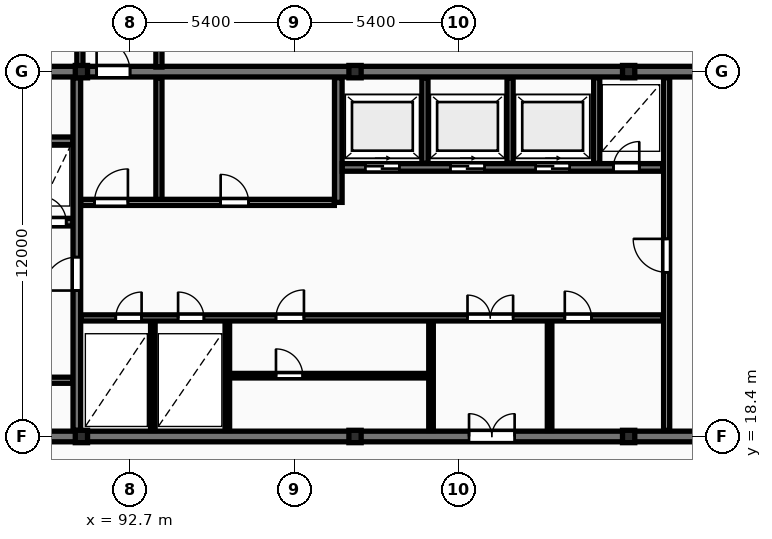
"""IFC4 building model, lengths in metres.
Left out: names, types, materials, properties, quantities, classifications, styles, units other than length and angle.
Written with IfcOpenShell. Run it as: python <this file> out.ifc"""

import sys

from ifc_helpers import new_model, si_unit, direction, frame, frame_2d, origin, origin_2d, place, context, subcontext, project, spatial, rectangle, i_section, extrude, element, fill, save


model = new_model("IFC4")
c1 = context("Model", 3, precision=1e-05, world=origin(), true_north=direction((0.0, 1.0)))
c2 = subcontext(c1, "Body", "Model", "MODEL_VIEW")
j1 = project(units=[si_unit("LENGTHUNIT", "METRE"), si_unit("PLANEANGLEUNIT", "RADIAN")], contexts=[c1])
p1 = place(None, origin())
s1 = spatial("IfcSite", under=j1, at=p1, CompositionType="ELEMENT")
p2 = place(p1, origin())
s2 = spatial("IfcBuilding", under=s1, at=p2, CompositionType="ELEMENT")
p3 = place(p2, frame((0.0, 0.0, 139.3)))
s3 = spatial("IfcBuildingStorey", under=s2, at=p3, CompositionType="ELEMENT", Elevation=139.3)
for number, where, z_axis, x_axis in (
    (1, (91.1, 18.4, 0.0), (0.0, 0.0, 1.0), (1.0, 0.0, 0.0)),
    (2, (91.1, 30.4, 0.0), (0.0, 0.0, 1.0), (1.0, 0.0, 0.0)),
    (3, (100.1, 18.4, 0.0), (0.0, 0.0, 1.0), (1.0, 0.0, 0.0)),
    (4, (100.1, 30.4, 0.0), (0.0, 0.0, 1.0), (1.0, 0.0, 0.0)),
    (5, (109.1, 18.4, 0.0), (0.0, 0.0, 1.0), (1.0, 0.0, 0.0)),
    (6, (109.1, 30.4, 0.0), (0.0, 0.0, 1.0), (1.0, 0.0, 0.0)),
):
    element("IfcColumn", number, at=place(p3, frame(where, z_axis=z_axis, x_axis=x_axis)), inside=s3, PredefinedType="COLUMN", context=c2, shape_type="SweptSolid", body=[
        extrude(i_section(OverallWidth=0.403, OverallDepth=0.406, WebThickness=0.027, FlangeThickness=0.043, FilletRadius=0.015, at=origin_2d()), origin(), (0.0, 0.0, 1.0), 3.6),
    ])
p4 = place(p3, frame((81.925, 30.4, 0.0), z_axis=(0.0, 0.0, 1.0), x_axis=(1.0, 0.0, 0.0)))
e7 = element("IfcWall", 7, at=p4, inside=s3, PredefinedType="SHEAR", context=c2, shape_type="SweptSolid", body=[
    extrude(rectangle(XDim=36.265, YDim=0.35, at=frame_2d((18.132, 0.0))), origin(), (0.0, 0.0, 1.0), 3.6),
])
p5 = place(p4, frame((9.675, 0.0, 0.0)))
e8 = element("IfcOpeningElement", 8, at=p5, cuts=e7, PredefinedType="OPENING", context=c2, shape_type="SweptSolid", body=[
    extrude(rectangle(XDim=1.1, YDim=2.1, at=frame_2d((0.55, 1.05))), frame((0.0, 0.185, 0.0), z_axis=(0.0, -1.0, 0.0), x_axis=(1.0, 0.0, 0.0)), (0.0, 0.0, 1.0), 0.37),
])
p6 = place(p3, frame((81.925, 18.4, 0.0), z_axis=(0.0, 0.0, 1.0), x_axis=(1.0, 0.0, 0.0)))
e9 = element("IfcWall", 9, at=p6, inside=s3, PredefinedType="SHEAR", context=c2, shape_type="SweptSolid", body=[
    extrude(rectangle(XDim=36.265, YDim=0.35, at=frame_2d((18.132, 0.0))), origin(), (0.0, 0.0, 1.0), 3.6),
])
p7 = place(p6, frame((5.675, 0.0, 0.0)))
e10 = element("IfcOpeningElement", 10, at=p7, cuts=e9, PredefinedType="OPENING", context=c2, shape_type="SweptSolid", body=[
    extrude(rectangle(XDim=1.0, YDim=2.15, at=frame_2d((0.5, 1.075))), frame((0.0, 0.185, 0.0), z_axis=(0.0, -1.0, 0.0), x_axis=(1.0, 0.0, 0.0)), (0.0, 0.0, 1.0), 0.37),
])
p8 = place(p6, frame((21.925, 0.0, 0.0)))
e11 = element("IfcOpeningElement", 11, at=p8, cuts=e9, PredefinedType="OPENING", context=c2, shape_type="SweptSolid", body=[
    extrude(rectangle(XDim=1.5, YDim=2.2, at=frame_2d((0.75, 1.1))), frame((0.0, 0.185, 0.0), z_axis=(0.0, -1.0, 0.0), x_axis=(1.0, 0.0, 0.0)), (0.0, 0.0, 1.0), 0.37),
])
p9 = place(p6, frame((29.875, 0.0, 0.0)))
e12 = element("IfcOpeningElement", 12, at=p9, cuts=e9, PredefinedType="OPENING", context=c2, shape_type="SweptSolid", body=[
    extrude(rectangle(XDim=1.0, YDim=2.15, at=frame_2d((0.5, 1.075))), frame((0.0, 0.185, 0.0), z_axis=(0.0, -1.0, 0.0), x_axis=(1.0, 0.0, 0.0)), (0.0, 0.0, 1.0), 0.37),
])
p10 = place(p3, frame((83.0, 28.125, 0.0), z_axis=(0.0, 0.0, 1.0), x_axis=(1.0, 0.0, 0.0)))
e13 = element("IfcWall", 13, at=p10, inside=s3, PredefinedType="SHEAR", context=c2, shape_type="SweptSolid", body=[
    extrude(rectangle(XDim=7.82, YDim=0.25, at=frame_2d((3.91, 0.0))), origin(), (0.0, 0.0, 1.0), 3.6),
])
p11 = place(p3, frame((86.5, 25.45, 0.0), z_axis=(0.0, 0.0, 1.0), x_axis=(1.0, 0.0, 0.0)))
e14 = element("IfcWall", 14, at=p11, inside=s3, PredefinedType="SHEAR", context=c2, shape_type="SweptSolid", body=[
    extrude(rectangle(XDim=4.32, YDim=0.25, at=frame_2d((2.16, 0.0))), origin(), (0.0, 0.0, 1.0), 3.6),
])
p12 = place(p11, frame((1.14, 0.0, 0.0)))
e15 = element("IfcOpeningElement", 15, at=p12, cuts=e14, PredefinedType="OPENING", context=c2, shape_type="SweptSolid", body=[
    extrude(rectangle(XDim=1.12, YDim=2.12, at=frame_2d((0.56, 1.06))), frame((0.0, 0.135, 0.0), z_axis=(0.0, -1.0, 0.0), x_axis=(1.0, 0.0, 0.0)), (0.0, 0.0, 1.0), 0.27),
])
p13 = place(p11, frame((3.25, 0.0, 0.0)))
e16 = element("IfcOpeningElement", 16, at=p13, cuts=e14, PredefinedType="OPENING", context=c2, shape_type="SweptSolid", body=[
    extrude(rectangle(XDim=0.85, YDim=2.05, at=frame_2d((0.425, 1.025))), frame((0.0, 0.135, 0.0), z_axis=(0.0, -1.0, 0.0), x_axis=(1.0, 0.0, 0.0)), (0.0, 0.0, 1.0), 0.27),
])
p14 = place(p3, frame((86.5, 20.25, 0.0), z_axis=(0.0, 0.0, 1.0), x_axis=(1.0, 0.0, 0.0)))
e17 = element("IfcWall", 17, at=p14, inside=s3, PredefinedType="PARTITIONING", context=c2, shape_type="SweptSolid", body=[
    extrude(rectangle(XDim=4.32, YDim=0.2, at=frame_2d((2.16, 0.0))), origin(), (0.0, 0.0, 1.0), 3.31),
])
p15 = place(p14, frame((1.4, 0.0, 0.0)))
e18 = element("IfcOpeningElement", 18, at=p15, cuts=e17, PredefinedType="OPENING", context=c2, shape_type="SweptSolid", body=[
    extrude(rectangle(XDim=1.1, YDim=2.1, at=frame_2d((0.55, 1.05))), frame((0.0, 0.11, 0.0), z_axis=(0.0, -1.0, 0.0), x_axis=(1.0, 0.0, 0.0)), (0.0, 0.0, 1.0), 0.22),
])
p16 = place(p3, frame((90.95, 18.6, 0.0), z_axis=(0.0, 0.0, 1.0), x_axis=(0.0, 1.0, 0.0)))
e19 = element("IfcWall", 19, at=p16, inside=s3, PredefinedType="SHEAR", context=c2, shape_type="SweptSolid", body=[
    extrude(rectangle(XDim=11.6, YDim=0.25, at=frame_2d((5.8, 0.0))), origin(), (0.0, 0.0, 1.0), 3.6),
])
p17 = place(p16, frame((4.6, 0.0, 0.0)))
e20 = element("IfcOpeningElement", 20, at=p17, cuts=e19, PredefinedType="OPENING", context=c2, shape_type="SweptSolid", body=[
    extrude(rectangle(XDim=1.1, YDim=2.1, at=frame_2d((0.55, 1.05))), frame((0.0, 0.135, 0.0), z_axis=(0.0, -1.0, 0.0), x_axis=(1.0, 0.0, 0.0)), (0.0, 0.0, 1.0), 0.27),
])
p18 = place(p3, frame((93.65, 26.1, 0.0), z_axis=(0.0, 0.0, 1.0), x_axis=(0.0, 1.0, 0.0)))
e21 = element("IfcWall", 21, at=p18, inside=s3, PredefinedType="PARTITIONING", context=c2, shape_type="SweptSolid", body=[
    extrude(rectangle(XDim=4.1, YDim=0.2, at=frame_2d((2.05, 0.0))), origin(), (0.0, 0.0, 1.0), 3.31),
])
p19 = place(p3, frame((91.08, 26.1, 0.0), z_axis=(0.0, 0.0, 1.0), x_axis=(1.0, 0.0, 0.0)))
e22 = element("IfcWall", 22, at=p19, inside=s3, PredefinedType="PARTITIONING", context=c2, shape_type="SweptSolid", body=[
    extrude(rectangle(XDim=8.34, YDim=0.2, at=frame_2d((4.17, 0.0))), origin(), (0.0, 0.0, 1.0), 3.31),
])
p20 = place(p19, frame((0.45, 0.0, 0.0)))
e23 = element("IfcOpeningElement", 23, at=p20, cuts=e22, PredefinedType="OPENING", context=c2, shape_type="SweptSolid", body=[
    extrude(rectangle(XDim=1.1, YDim=2.1, at=frame_2d((0.55, 1.05))), frame((0.0, 0.11, 0.0), z_axis=(0.0, -1.0, 0.0), x_axis=(1.0, 0.0, 0.0)), (0.0, 0.0, 1.0), 0.22),
])
p21 = place(p19, frame((4.6, 0.0, 0.0)))
e24 = element("IfcOpeningElement", 24, at=p21, cuts=e22, PredefinedType="OPENING", context=c2, shape_type="SweptSolid", body=[
    extrude(rectangle(XDim=0.92, YDim=2.08, at=frame_2d((0.46, 1.04))), frame((0.0, 0.11, 0.0), z_axis=(0.0, -1.0, 0.0), x_axis=(1.0, 0.0, 0.0)), (0.0, 0.0, 1.0), 0.22),
])
p22 = place(p3, frame((99.55, 26.1, 0.0), z_axis=(0.0, 0.0, 1.0), x_axis=(0.0, 1.0, 0.0)))
e25 = element("IfcWall", 25, at=p22, inside=s3, PredefinedType="SHEAR", context=c2, shape_type="SweptSolid", body=[
    extrude(rectangle(XDim=4.1, YDim=0.25, at=frame_2d((2.05, 0.0))), origin(), (0.0, 0.0, 1.0), 3.6),
])
for number, where, z_axis, x_axis in (
    (26, (102.4, 27.38, 0.0), (0.0, 0.0, 1.0), (0.0, 1.0, 0.0)),
    (27, (105.2, 27.38, 0.0), (0.0, 0.0, 1.0), (0.0, 1.0, 0.0)),
    (28, (108.05, 27.38, 0.0), (0.0, 0.0, 1.0), (0.0, 1.0, 0.0)),
):
    element("IfcWall", number, at=place(p3, frame(where, z_axis=z_axis, x_axis=x_axis)), inside=s3, PredefinedType="PARTITIONING", context=c2, shape_type="SweptSolid", body=[
        extrude(rectangle(XDim=2.82, YDim=0.2, at=frame_2d((1.41, 0.0))), origin(), (0.0, 0.0, 1.0), 3.31),
    ])
p23 = place(p3, frame((99.68, 27.25, 0.0), z_axis=(0.0, 0.0, 1.0), x_axis=(1.0, 0.0, 0.0)))
e29 = element("IfcWall", 29, at=p23, inside=s3, PredefinedType="SHEAR", context=c2, shape_type="SweptSolid", body=[
    extrude(rectangle(XDim=10.54, YDim=0.25, at=frame_2d((5.27, 0.0))), origin(), (0.0, 0.0, 1.0), 3.6),
])
p24 = place(p23, frame((0.76, 0.0, 0.0)))
e30 = element("IfcOpeningElement", 30, at=p24, cuts=e29, PredefinedType="OPENING", context=c2, shape_type="SweptSolid", body=[
    extrude(rectangle(XDim=1.12, YDim=2.12, at=frame_2d((0.56, 1.06))), frame((0.0, 0.135, 0.0), z_axis=(0.0, -1.0, 0.0), x_axis=(1.0, 0.0, 0.0)), (0.0, 0.0, 1.0), 0.27),
])
p25 = place(p23, frame((3.56, 0.0, 0.0)))
e31 = element("IfcOpeningElement", 31, at=p25, cuts=e29, PredefinedType="OPENING", context=c2, shape_type="SweptSolid", body=[
    extrude(rectangle(XDim=1.12, YDim=2.12, at=frame_2d((0.56, 1.06))), frame((0.0, 0.135, 0.0), z_axis=(0.0, -1.0, 0.0), x_axis=(1.0, 0.0, 0.0)), (0.0, 0.0, 1.0), 0.27),
])
p26 = place(p23, frame((6.36, 0.0, 0.0)))
e32 = element("IfcOpeningElement", 32, at=p26, cuts=e29, PredefinedType="OPENING", context=c2, shape_type="SweptSolid", body=[
    extrude(rectangle(XDim=1.12, YDim=2.12, at=frame_2d((0.56, 1.06))), frame((0.0, 0.135, 0.0), z_axis=(0.0, -1.0, 0.0), x_axis=(1.0, 0.0, 0.0)), (0.0, 0.0, 1.0), 0.27),
])
p27 = place(p23, frame((8.92, 0.0, 0.0)))
e33 = element("IfcOpeningElement", 33, at=p27, cuts=e29, PredefinedType="OPENING", context=c2, shape_type="SweptSolid", body=[
    extrude(rectangle(XDim=0.85, YDim=2.05, at=frame_2d((0.425, 1.025))), frame((0.0, 0.135, 0.0), z_axis=(0.0, -1.0, 0.0), x_axis=(1.0, 0.0, 0.0)), (0.0, 0.0, 1.0), 0.27),
])
for number, where, z_axis, x_axis in (
    (34, (93.45, 18.6, 0.0), (0.0, 0.0, 1.0), (0.0, 1.0, 0.0)),
    (35, (95.9, 18.6, 0.0), (0.0, 0.0, 1.0), (0.0, 1.0, 0.0)),
):
    element("IfcWall", number, at=place(p3, frame(where, z_axis=z_axis, x_axis=x_axis)), inside=s3, PredefinedType="PARTITIONING", context=c2, shape_type="SweptSolid", body=[
        extrude(rectangle(XDim=3.6, YDim=0.15, at=frame_2d((1.8, 0.0))), origin(), (0.0, 0.0, 1.0), 3.31),
    ])
p28 = place(p3, frame((95.9, 20.4, 0.0), z_axis=(0.0, 0.0, 1.0), x_axis=(1.0, 0.0, 0.0)))
e36 = element("IfcWall", 36, at=p28, inside=s3, PredefinedType="PARTITIONING", context=c2, shape_type="SweptSolid", body=[
    extrude(rectangle(XDim=6.7, YDim=0.15, at=frame_2d((3.35, 0.0))), origin(), (0.0, 0.0, 1.0), 3.31),
])
p29 = place(p28, frame((1.6, 0.0, 0.0)))
e37 = element("IfcOpeningElement", 37, at=p29, cuts=e36, PredefinedType="OPENING", context=c2, shape_type="SweptSolid", body=[
    extrude(rectangle(XDim=0.88, YDim=2.06, at=frame_2d((0.44, 1.03))), frame((0.0, 0.085, 0.0), z_axis=(0.0, -1.0, 0.0), x_axis=(1.0, 0.0, 0.0)), (0.0, 0.0, 1.0), 0.17),
])
for number, where, z_axis, x_axis in (
    (38, (102.6, 18.6, 0.0), (0.0, 0.0, 1.0), (0.0, 1.0, 0.0)),
    (39, (106.5, 18.6, 0.0), (0.0, 0.0, 1.0), (0.0, 1.0, 0.0)),
):
    element("IfcWall", number, at=place(p3, frame(where, z_axis=z_axis, x_axis=x_axis)), inside=s3, PredefinedType="PARTITIONING", context=c2, shape_type="SweptSolid", body=[
        extrude(rectangle(XDim=3.6, YDim=0.15, at=frame_2d((1.8, 0.0))), origin(), (0.0, 0.0, 1.0), 3.31),
    ])
p30 = place(p3, frame((91.08, 22.3, 0.0), z_axis=(0.0, 0.0, 1.0), x_axis=(1.0, 0.0, 0.0)))
e40 = element("IfcWall", 40, at=p30, inside=s3, PredefinedType="PARTITIONING", context=c2, shape_type="SweptSolid", body=[
    extrude(rectangle(XDim=19.14, YDim=0.2, at=frame_2d((9.57, 0.0))), origin(), (0.0, 0.0, 1.0), 3.31),
])
p31 = place(p30, frame((1.15, 0.0, 0.0)))
e41 = element("IfcOpeningElement", 41, at=p31, cuts=e40, PredefinedType="OPENING", context=c2, shape_type="SweptSolid", body=[
    extrude(rectangle(XDim=0.85, YDim=2.05, at=frame_2d((0.425, 1.025))), frame((0.0, 0.11, 0.0), z_axis=(0.0, -1.0, 0.0), x_axis=(1.0, 0.0, 0.0)), (0.0, 0.0, 1.0), 0.22),
])
p32 = place(p30, frame((3.2, 0.0, 0.0)))
e42 = element("IfcOpeningElement", 42, at=p32, cuts=e40, PredefinedType="OPENING", context=c2, shape_type="SweptSolid", body=[
    extrude(rectangle(XDim=0.85, YDim=2.05, at=frame_2d((0.425, 1.025))), frame((0.0, 0.11, 0.0), z_axis=(0.0, -1.0, 0.0), x_axis=(1.0, 0.0, 0.0)), (0.0, 0.0, 1.0), 0.22),
])
p33 = place(p30, frame((12.72, 0.0, 0.0)))
e43 = element("IfcOpeningElement", 43, at=p33, cuts=e40, PredefinedType="OPENING", context=c2, shape_type="SweptSolid", body=[
    extrude(rectangle(XDim=1.5, YDim=2.2, at=frame_2d((0.75, 1.1))), frame((0.0, 0.11, 0.0), z_axis=(0.0, -1.0, 0.0), x_axis=(1.0, 0.0, 0.0)), (0.0, 0.0, 1.0), 0.22),
])
p34 = place(p30, frame((6.42, 0.0, 0.0)))
e44 = element("IfcOpeningElement", 44, at=p34, cuts=e40, PredefinedType="OPENING", context=c2, shape_type="SweptSolid", body=[
    extrude(rectangle(XDim=0.92, YDim=2.08, at=frame_2d((0.46, 1.04))), frame((0.0, 0.11, 0.0), z_axis=(0.0, -1.0, 0.0), x_axis=(1.0, 0.0, 0.0)), (0.0, 0.0, 1.0), 0.22),
])
p35 = place(p30, frame((15.92, 0.0, 0.0)))
e45 = element("IfcOpeningElement", 45, at=p35, cuts=e40, PredefinedType="OPENING", context=c2, shape_type="SweptSolid", body=[
    extrude(rectangle(XDim=0.88, YDim=2.06, at=frame_2d((0.44, 1.03))), frame((0.0, 0.11, 0.0), z_axis=(0.0, -1.0, 0.0), x_axis=(1.0, 0.0, 0.0)), (0.0, 0.0, 1.0), 0.22),
])
p36 = place(p3, frame((110.35, 18.6, 0.0), z_axis=(0.0, 0.0, 1.0), x_axis=(0.0, 1.0, 0.0)))
e46 = element("IfcWall", 46, at=p36, inside=s3, PredefinedType="PARTITIONING", context=c2, shape_type="SweptSolid", body=[
    extrude(rectangle(XDim=11.6, YDim=0.2, at=frame_2d((5.8, 0.0))), origin(), (0.0, 0.0, 1.0), 3.31),
])
p37 = place(p36, frame((5.2, 0.0, 0.0)))
e47 = element("IfcOpeningElement", 47, at=p37, cuts=e46, PredefinedType="OPENING", context=c2, shape_type="SweptSolid", body=[
    extrude(rectangle(XDim=1.1, YDim=2.15, at=frame_2d((0.55, 1.075))), frame((0.0, 0.11, 0.0), z_axis=(0.0, -1.0, 0.0), x_axis=(1.0, 0.0, 0.0)), (0.0, 0.0, 1.0), 0.22),
])
p38 = place(p3, frame((91.05, 30.55, 0.0), z_axis=(0.0, 0.0, 1.0), x_axis=(0.0, 1.0, 0.0)))
e48 = element("IfcWall", 48, at=p38, inside=s3, PredefinedType="PARTITIONING", context=c2, shape_type="SweptSolid", body=[
    extrude(rectangle(XDim=2.2, YDim=0.2, at=frame_2d((1.1, 0.0))), origin(), (0.0, 0.0, 1.0), 3.31),
])
p39 = place(p3, frame((93.65, 30.55, 0.0), z_axis=(0.0, 0.0, 1.0), x_axis=(0.0, 1.0, 0.0)))
e49 = element("IfcWall", 49, at=p39, inside=s3, PredefinedType="PARTITIONING", context=c2, shape_type="SweptSolid", body=[
    extrude(rectangle(XDim=2.2, YDim=0.2, at=frame_2d((1.1, 0.0))), origin(), (0.0, 0.0, 1.0), 2.383),
])
p40 = place(p5, origin())
e50 = element("IfcDoor", 50, at=p40, inside=s3, OperationType="SINGLE_SWING_LEFT", PredefinedType="DOOR", context=c2, shape_type="SweptSolid", body=[
    extrude(rectangle(XDim=1.1, YDim=2.1, at=frame_2d((0.55, 1.05))), frame((0.0, 0.025, 0.0), z_axis=(0.0, -1.0, 0.0), x_axis=(1.0, 0.0, 0.0)), (0.0, 0.0, 1.0), 0.05),
])
fill(e8, e50)
p41 = place(p8, origin())
e51 = element("IfcDoor", 51, at=p41, inside=s3, OperationType="DOUBLE_DOOR_SINGLE_SWING", PredefinedType="DOOR", context=c2, shape_type="SweptSolid", body=[
    extrude(rectangle(XDim=1.5, YDim=2.2, at=frame_2d((0.75, 1.1))), frame((0.0, 0.025, 0.0), z_axis=(0.0, -1.0, 0.0), x_axis=(1.0, 0.0, 0.0)), (0.0, 0.0, 1.0), 0.05),
])
fill(e11, e51)
p42 = place(p13, origin())
e52 = element("IfcDoor", 52, at=p42, inside=s3, OperationType="SINGLE_SWING_LEFT", PredefinedType="DOOR", context=c2, shape_type="SweptSolid", body=[
    extrude(rectangle(XDim=0.85, YDim=2.05, at=frame_2d((0.425, 1.025))), frame((0.0, 0.025, 0.0), z_axis=(0.0, -1.0, 0.0), x_axis=(1.0, 0.0, 0.0)), (0.0, 0.0, 1.0), 0.05),
])
fill(e16, e52)
p43 = place(p17, origin())
e53 = element("IfcDoor", 53, at=p43, inside=s3, OperationType="SINGLE_SWING_LEFT", PredefinedType="DOOR", context=c2, shape_type="SweptSolid", body=[
    extrude(rectangle(XDim=1.1, YDim=2.1, at=frame_2d((0.55, 1.05))), frame((0.0, 0.025, 0.0), z_axis=(0.0, -1.0, 0.0), x_axis=(1.0, 0.0, 0.0)), (0.0, 0.0, 1.0), 0.05),
])
fill(e20, e53)
p44 = place(p20, origin())
e54 = element("IfcDoor", 54, at=p44, inside=s3, OperationType="SINGLE_SWING_RIGHT", PredefinedType="DOOR", context=c2, shape_type="SweptSolid", body=[
    extrude(rectangle(XDim=1.1, YDim=2.1, at=frame_2d((0.55, 1.05))), frame((0.0, 0.025, 0.0), z_axis=(0.0, -1.0, 0.0), x_axis=(1.0, 0.0, 0.0)), (0.0, 0.0, 1.0), 0.05),
])
fill(e23, e54)
p45 = place(p21, origin())
e55 = element("IfcDoor", 55, at=p45, inside=s3, OperationType="SINGLE_SWING_LEFT", PredefinedType="DOOR", context=c2, shape_type="SweptSolid", body=[
    extrude(rectangle(XDim=0.92, YDim=2.08, at=frame_2d((0.46, 1.04))), frame((0.0, 0.025, 0.0), z_axis=(0.0, -1.0, 0.0), x_axis=(1.0, 0.0, 0.0)), (0.0, 0.0, 1.0), 0.05),
])
fill(e24, e55)
p46 = place(p24, origin())
e56 = element("IfcDoor", 56, at=p46, inside=s3, OperationType="SLIDING_TO_RIGHT", PredefinedType="DOOR", context=c2, shape_type="SweptSolid", body=[
    extrude(rectangle(XDim=1.12, YDim=2.12, at=frame_2d((0.56, 1.06))), frame((0.0, 0.025, 0.0), z_axis=(0.0, -1.0, 0.0), x_axis=(1.0, 0.0, 0.0)), (0.0, 0.0, 1.0), 0.05),
])
fill(e30, e56)
p47 = place(p25, origin())
e57 = element("IfcDoor", 57, at=p47, inside=s3, OperationType="SLIDING_TO_RIGHT", PredefinedType="DOOR", context=c2, shape_type="SweptSolid", body=[
    extrude(rectangle(XDim=1.12, YDim=2.12, at=frame_2d((0.56, 1.06))), frame((0.0, 0.025, 0.0), z_axis=(0.0, -1.0, 0.0), x_axis=(1.0, 0.0, 0.0)), (0.0, 0.0, 1.0), 0.05),
])
fill(e31, e57)
p48 = place(p26, origin())
e58 = element("IfcDoor", 58, at=p48, inside=s3, OperationType="SLIDING_TO_RIGHT", PredefinedType="DOOR", context=c2, shape_type="SweptSolid", body=[
    extrude(rectangle(XDim=1.12, YDim=2.12, at=frame_2d((0.56, 1.06))), frame((0.0, 0.025, 0.0), z_axis=(0.0, -1.0, 0.0), x_axis=(1.0, 0.0, 0.0)), (0.0, 0.0, 1.0), 0.05),
])
fill(e32, e58)
p49 = place(p27, origin())
e59 = element("IfcDoor", 59, at=p49, inside=s3, OperationType="SINGLE_SWING_RIGHT", PredefinedType="DOOR", context=c2, shape_type="SweptSolid", body=[
    extrude(rectangle(XDim=0.85, YDim=2.05, at=frame_2d((0.425, 1.025))), frame((0.0, 0.025, 0.0), z_axis=(0.0, -1.0, 0.0), x_axis=(1.0, 0.0, 0.0)), (0.0, 0.0, 1.0), 0.05),
])
fill(e33, e59)
p50 = place(p29, origin())
e60 = element("IfcDoor", 60, at=p50, inside=s3, OperationType="SINGLE_SWING_LEFT", PredefinedType="DOOR", context=c2, shape_type="SweptSolid", body=[
    extrude(rectangle(XDim=0.88, YDim=2.06, at=frame_2d((0.44, 1.03))), frame((0.0, 0.025, 0.0), z_axis=(0.0, -1.0, 0.0), x_axis=(1.0, 0.0, 0.0)), (0.0, 0.0, 1.0), 0.05),
])
fill(e37, e60)
p51 = place(p31, origin())
e61 = element("IfcDoor", 61, at=p51, inside=s3, OperationType="SINGLE_SWING_RIGHT", PredefinedType="DOOR", context=c2, shape_type="SweptSolid", body=[
    extrude(rectangle(XDim=0.85, YDim=2.05, at=frame_2d((0.425, 1.025))), frame((0.0, 0.025, 0.0), z_axis=(0.0, -1.0, 0.0), x_axis=(1.0, 0.0, 0.0)), (0.0, 0.0, 1.0), 0.05),
])
fill(e41, e61)
p52 = place(p32, origin())
e62 = element("IfcDoor", 62, at=p52, inside=s3, OperationType="SINGLE_SWING_LEFT", PredefinedType="DOOR", context=c2, shape_type="SweptSolid", body=[
    extrude(rectangle(XDim=0.85, YDim=2.05, at=frame_2d((0.425, 1.025))), frame((0.0, 0.025, 0.0), z_axis=(0.0, -1.0, 0.0), x_axis=(1.0, 0.0, 0.0)), (0.0, 0.0, 1.0), 0.05),
])
fill(e42, e62)
p53 = place(p33, origin())
e63 = element("IfcDoor", 63, at=p53, inside=s3, OperationType="DOUBLE_DOOR_SINGLE_SWING", PredefinedType="DOOR", context=c2, shape_type="SweptSolid", body=[
    extrude(rectangle(XDim=1.5, YDim=2.2, at=frame_2d((0.75, 1.1))), frame((0.0, 0.025, 0.0), z_axis=(0.0, -1.0, 0.0), x_axis=(1.0, 0.0, 0.0)), (0.0, 0.0, 1.0), 0.05),
])
fill(e43, e63)
p54 = place(p34, origin())
e64 = element("IfcDoor", 64, at=p54, inside=s3, OperationType="SINGLE_SWING_RIGHT", PredefinedType="DOOR", context=c2, shape_type="SweptSolid", body=[
    extrude(rectangle(XDim=0.92, YDim=2.08, at=frame_2d((0.46, 1.04))), frame((0.0, 0.025, 0.0), z_axis=(0.0, -1.0, 0.0), x_axis=(1.0, 0.0, 0.0)), (0.0, 0.0, 1.0), 0.05),
])
fill(e44, e64)
p55 = place(p35, origin())
e65 = element("IfcDoor", 65, at=p55, inside=s3, OperationType="SINGLE_SWING_LEFT", PredefinedType="DOOR", context=c2, shape_type="SweptSolid", body=[
    extrude(rectangle(XDim=0.88, YDim=2.06, at=frame_2d((0.44, 1.03))), frame((0.0, 0.025, 0.0), z_axis=(0.0, -1.0, 0.0), x_axis=(1.0, 0.0, 0.0)), (0.0, 0.0, 1.0), 0.05),
])
fill(e45, e65)
p56 = place(p37, origin())
e66 = element("IfcDoor", 66, at=p56, inside=s3, OperationType="SINGLE_SWING_RIGHT", PredefinedType="DOOR", context=c2, shape_type="SweptSolid", body=[
    extrude(rectangle(XDim=1.1, YDim=2.15, at=frame_2d((0.55, 1.075))), frame((0.0, 0.025, 0.0), z_axis=(0.0, -1.0, 0.0), x_axis=(1.0, 0.0, 0.0)), (0.0, 0.0, 1.0), 0.05),
])
fill(e47, e66)
save(model, sys.argv[1])
